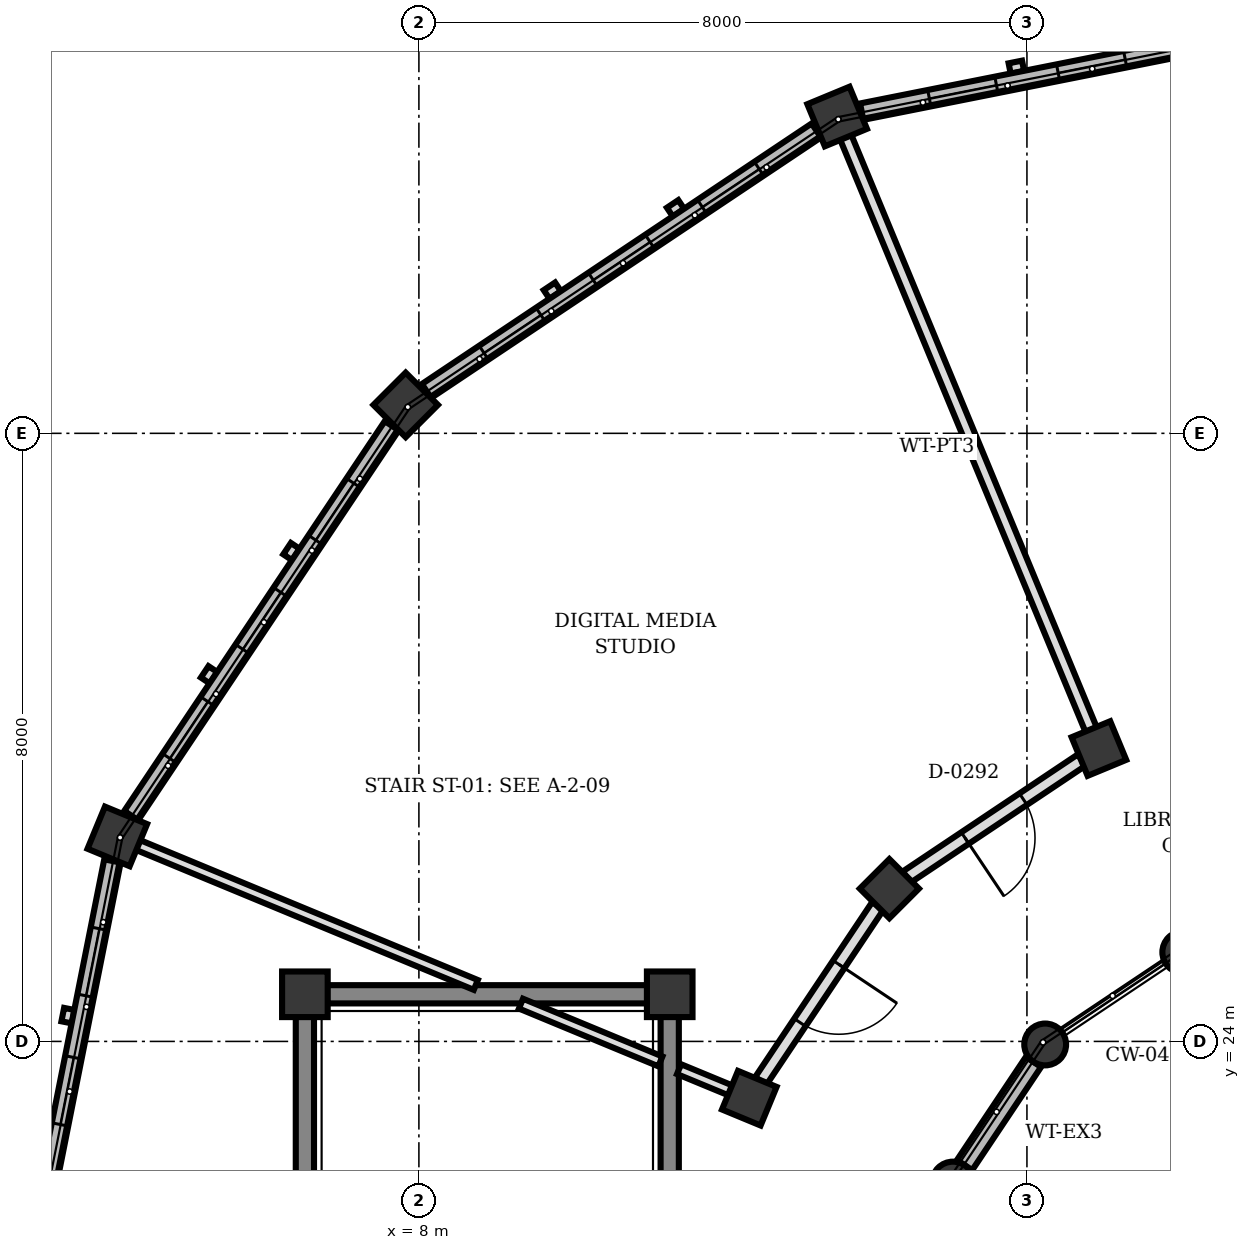
"""IFC4 building model, lengths in metres.
Left out: names, types, materials, properties, quantities, classifications, styles, units other than length and angle.
Written with IfcOpenShell. Run it as: python <this file> out.ifc"""

import sys

from ifc_helpers import new_model, si_unit, direction, frame, frame_2d, origin, origin_2d, place, context, subcontext, project, spatial, rectangle, circle, extrude, element, fill, save


model = new_model("IFC4")
c1 = context("Model", 3, precision=1e-05, world=origin(), true_north=direction((0.0, 1.0)))
c2 = subcontext(c1, "Body", "Model", "MODEL_VIEW")
j1 = project(units=[si_unit("LENGTHUNIT", "METRE"), si_unit("PLANEANGLEUNIT", "RADIAN")], contexts=[c1])
p1 = place(None, origin())
s1 = spatial("IfcSite", under=j1, at=p1, CompositionType="ELEMENT")
p2 = place(p1, origin())
s2 = spatial("IfcBuilding", under=s1, at=p2, CompositionType="ELEMENT")
p3 = place(p2, frame((0.0, 0.0, 4.5)))
s3 = spatial("IfcBuildingStorey", under=s2, at=p3, CompositionType="ELEMENT", Elevation=4.5)
for number, where, z_axis, x_axis in (
    (1, (11.3, 24.62, 0.0), (0.0, 0.0, 1.0), (1.0, 0.0, 0.0)),
    (2, (6.5, 24.62, 0.0), (0.0, 0.0, 1.0), (1.0, 0.0, 0.0)),
):
    element("IfcColumn", number, at=place(p3, frame(where, z_axis=z_axis, x_axis=x_axis)), inside=s3, PredefinedType="COLUMN", context=c2, shape_type="SweptSolid", body=[
        extrude(rectangle(XDim=0.6, YDim=0.6, at=origin_2d()), origin(), (0.0, 0.0, 1.0), 4.0),
    ])
for number, where, z_axis, x_axis in (
    (3, (18.057, 25.174, 0.0), (0.0, 0.0, 1.0), (1.0, 0.0, 0.0)),
    (4, (16.24, 23.96, 0.0), (0.0, 0.0, 1.0), (1.0, 0.0, 0.0)),
    (5, (15.026, 22.143, 0.0), (0.0, 0.0, 1.0), (1.0, 0.0, 0.0)),
):
    element("IfcColumn", number, at=place(p3, frame(where, z_axis=z_axis, x_axis=x_axis)), inside=s3, PredefinedType="COLUMN", context=c2, shape_type="SweptSolid", body=[
        extrude(circle(Radius=0.275, at=origin_2d()), origin(), (0.0, 0.0, 1.0), 4.0),
    ])
for number, where, z_axis, x_axis in (
    (6, (16.947, 27.853, 0.0), (0.0, 0.0, 1.0), (-0.383, 0.924, 0.0)),
    (7, (14.19, 26.01, 0.0), (0.0, 0.0, 1.0), (-0.707, 0.707, 0.0)),
    (8, (12.347, 23.253, 0.0), (0.0, 0.0, 1.0), (-0.924, 0.383, 0.0)),
):
    element("IfcColumn", number, at=place(p3, frame(where, z_axis=z_axis, x_axis=x_axis)), inside=s3, PredefinedType="COLUMN", context=c2, shape_type="SweptSolid", body=[
        extrude(rectangle(XDim=0.55, YDim=0.55, at=origin_2d()), origin(), (0.0, 0.0, 1.0), 4.0),
    ])
for number, where, z_axis, x_axis in (
    (9, (13.503, 36.168, 0.0), (0.0, 0.0, 1.0), (-0.383, 0.924, 0.0)),
    (10, (7.826, 32.374, 0.0), (0.0, 0.0, 1.0), (-0.707, 0.707, 0.0)),
    (11, (4.032, 26.697, 0.0), (0.0, 0.0, 1.0), (-0.924, 0.383, 0.0)),
):
    element("IfcColumn", number, at=place(p3, frame(where, z_axis=z_axis, x_axis=x_axis)), inside=s3, PredefinedType="COLUMN", context=c2, shape_type="SweptSolid", body=[
        extrude(rectangle(XDim=0.6, YDim=0.6, at=origin_2d()), origin(), (0.0, 0.0, 1.0), 4.0),
    ])
p4 = place(p3, frame((13.826, 36.232, 0.0), z_axis=(0.0, 0.0, 1.0), x_axis=(0.980770460131, 0.195164813773, 0.0)))
e12 = element("IfcWall", 12, at=p4, inside=s3, PredefinedType="SOLIDWALL", context=c2, shape_type="SweptSolid", body=[
    extrude(rectangle(XDim=6.17, YDim=0.22, at=frame_2d((3.085, 0.0))), origin(), (0.0, 0.0, 1.0), 3.172),
])
p5 = place(p4, frame((0.907, 0.0, 0.85)))
e13 = element("IfcOpeningElement", 13, at=p5, cuts=e12, PredefinedType="OPENING", context=c2, shape_type="SweptSolid", body=[
    extrude(rectangle(XDim=0.9, YDim=1.4, at=frame_2d((0.45, 0.7))), frame((0.0, 0.12, 0.0), z_axis=(0.0, -1.0, 0.0), x_axis=(1.0, 0.0, 0.0)), (0.0, 0.0, 1.0), 0.24),
])
p6 = place(p4, frame((2.635, 0.0, 0.85)))
e14 = element("IfcOpeningElement", 14, at=p6, cuts=e12, PredefinedType="OPENING", context=c2, shape_type="SweptSolid", body=[
    extrude(rectangle(XDim=0.9, YDim=1.4, at=frame_2d((0.45, 0.7))), frame((0.0, 0.12, 0.0), z_axis=(0.0, -1.0, 0.0), x_axis=(1.0, 0.0, 0.0)), (0.0, 0.0, 1.0), 0.24),
])
p7 = place(p4, frame((4.362, 0.0, 0.85)))
e15 = element("IfcOpeningElement", 15, at=p7, cuts=e12, PredefinedType="OPENING", context=c2, shape_type="SweptSolid", body=[
    extrude(rectangle(XDim=0.9, YDim=1.4, at=frame_2d((0.45, 0.7))), frame((0.0, 0.12, 0.0), z_axis=(0.0, -1.0, 0.0), x_axis=(1.0, 0.0, 0.0)), (0.0, 0.0, 1.0), 0.24),
])
p8 = place(p3, frame((8.1, 32.557, 0.0), z_axis=(0.0, 0.0, 1.0), x_axis=(0.831379966495, 0.555704374025, 0.0)))
e16 = element("IfcWall", 16, at=p8, inside=s3, PredefinedType="SOLIDWALL", context=c2, shape_type="SweptSolid", body=[
    extrude(rectangle(XDim=6.169, YDim=0.22, at=frame_2d((3.084, 0.0))), origin(), (0.0, 0.0, 1.0), 3.172),
])
p9 = place(p8, frame((0.907, 0.0, 0.85)))
e17 = element("IfcOpeningElement", 17, at=p9, cuts=e16, PredefinedType="OPENING", context=c2, shape_type="SweptSolid", body=[
    extrude(rectangle(XDim=0.9, YDim=1.4, at=frame_2d((0.45, 0.7))), frame((0.0, 0.12, 0.0), z_axis=(0.0, -1.0, 0.0), x_axis=(1.0, 0.0, 0.0)), (0.0, 0.0, 1.0), 0.24),
])
p10 = place(p8, frame((2.635, 0.0, 0.85)))
e18 = element("IfcOpeningElement", 18, at=p10, cuts=e16, PredefinedType="OPENING", context=c2, shape_type="SweptSolid", body=[
    extrude(rectangle(XDim=0.9, YDim=1.4, at=frame_2d((0.45, 0.7))), frame((0.0, 0.12, 0.0), z_axis=(0.0, -1.0, 0.0), x_axis=(1.0, 0.0, 0.0)), (0.0, 0.0, 1.0), 0.24),
])
p11 = place(p8, frame((4.362, 0.0, 0.85)))
e19 = element("IfcOpeningElement", 19, at=p11, cuts=e16, PredefinedType="OPENING", context=c2, shape_type="SweptSolid", body=[
    extrude(rectangle(XDim=0.9, YDim=1.4, at=frame_2d((0.45, 0.7))), frame((0.0, 0.12, 0.0), z_axis=(0.0, -1.0, 0.0), x_axis=(1.0, 0.0, 0.0)), (0.0, 0.0, 1.0), 0.24),
])
p12 = place(p3, frame((4.215, 26.971, 0.0), z_axis=(0.0, 0.0, 1.0), x_axis=(0.555658736667, 0.831410469242, 0.0)))
e20 = element("IfcWall", 20, at=p12, inside=s3, PredefinedType="SOLIDWALL", context=c2, shape_type="SweptSolid", body=[
    extrude(rectangle(XDim=6.169, YDim=0.22, at=frame_2d((3.084, 0.0))), origin(), (0.0, 0.0, 1.0), 3.172),
])
p13 = place(p12, frame((0.907, 0.0, 0.85)))
e21 = element("IfcOpeningElement", 21, at=p13, cuts=e20, PredefinedType="OPENING", context=c2, shape_type="SweptSolid", body=[
    extrude(rectangle(XDim=0.9, YDim=1.4, at=frame_2d((0.45, 0.7))), frame((0.0, 0.12, 0.0), z_axis=(0.0, -1.0, 0.0), x_axis=(1.0, 0.0, 0.0)), (0.0, 0.0, 1.0), 0.24),
])
p14 = place(p12, frame((2.635, 0.0, 0.85)))
e22 = element("IfcOpeningElement", 22, at=p14, cuts=e20, PredefinedType="OPENING", context=c2, shape_type="SweptSolid", body=[
    extrude(rectangle(XDim=0.9, YDim=1.4, at=frame_2d((0.45, 0.7))), frame((0.0, 0.12, 0.0), z_axis=(0.0, -1.0, 0.0), x_axis=(1.0, 0.0, 0.0)), (0.0, 0.0, 1.0), 0.24),
])
p15 = place(p12, frame((4.362, 0.0, 0.85)))
e23 = element("IfcOpeningElement", 23, at=p15, cuts=e20, PredefinedType="OPENING", context=c2, shape_type="SweptSolid", body=[
    extrude(rectangle(XDim=0.9, YDim=1.4, at=frame_2d((0.45, 0.7))), frame((0.0, 0.12, 0.0), z_axis=(0.0, -1.0, 0.0), x_axis=(1.0, 0.0, 0.0)), (0.0, 0.0, 1.0), 0.24),
])
p16 = place(p3, frame((16.086, 23.73, 0.0), z_axis=(0.0, 0.0, 1.0), x_axis=(-0.555287078904, -0.83165874011, 0.0)))
e24 = element("IfcWall", 24, at=p16, inside=s3, PredefinedType="SOLIDWALL", context=c2, shape_type="SweptSolid", body=[
    extrude(rectangle(XDim=1.632, YDim=0.24, at=frame_2d((0.816, 0.0))), origin(), (0.0, 0.0, 1.0), 3.222),
])
p17 = place(p3, frame((2.764, 20.323, 0.0), z_axis=(0.0, 0.0, 1.0), x_axis=(0.195164813773, 0.980770460131, 0.0)))
e25 = element("IfcWall", 25, at=p17, inside=s3, PredefinedType="SOLIDWALL", context=c2, shape_type="SweptSolid", body=[
    extrude(rectangle(XDim=6.17, YDim=0.22, at=frame_2d((3.085, 0.0))), origin(), (0.0, 0.0, 1.0), 3.172),
])
p18 = place(p17, frame((0.907, 0.0, 0.85)))
e26 = element("IfcOpeningElement", 26, at=p18, cuts=e25, PredefinedType="OPENING", context=c2, shape_type="SweptSolid", body=[
    extrude(rectangle(XDim=0.9, YDim=1.4, at=frame_2d((0.45, 0.7))), frame((0.0, 0.12, 0.0), z_axis=(0.0, -1.0, 0.0), x_axis=(1.0, 0.0, 0.0)), (0.0, 0.0, 1.0), 0.24),
])
p19 = place(p17, frame((2.635, 0.0, 0.85)))
e27 = element("IfcOpeningElement", 27, at=p19, cuts=e25, PredefinedType="OPENING", context=c2, shape_type="SweptSolid", body=[
    extrude(rectangle(XDim=0.9, YDim=1.4, at=frame_2d((0.45, 0.7))), frame((0.0, 0.12, 0.0), z_axis=(0.0, -1.0, 0.0), x_axis=(1.0, 0.0, 0.0)), (0.0, 0.0, 1.0), 0.24),
])
p20 = place(p17, frame((4.362, 0.0, 0.85)))
e28 = element("IfcOpeningElement", 28, at=p20, cuts=e25, PredefinedType="OPENING", context=c2, shape_type="SweptSolid", body=[
    extrude(rectangle(XDim=0.9, YDim=1.4, at=frame_2d((0.45, 0.7))), frame((0.0, 0.12, 0.0), z_axis=(0.0, -1.0, 0.0), x_axis=(1.0, 0.0, 0.0)), (0.0, 0.0, 1.0), 0.24),
])
p21 = place(p3, frame((6.5, 16.192, 0.0), z_axis=(0.0, 0.0, 1.0), x_axis=(0.0, 1.0, 0.0)))
e29 = element("IfcWall", 29, at=p21, inside=s3, PredefinedType="SHEAR", context=c2, shape_type="SweptSolid", body=[
    extrude(rectangle(XDim=8.136, YDim=0.24, at=frame_2d((4.068, 0.0))), origin(), (0.0, 0.0, 1.0), 3.74),
])
p22 = place(p3, frame((11.3, 24.328, 0.0), z_axis=(0.0, 0.0, 1.0), x_axis=(0.0, -1.0, 0.0)))
e30 = element("IfcWall", 30, at=p22, inside=s3, PredefinedType="SHEAR", context=c2, shape_type="SweptSolid", body=[
    extrude(rectangle(XDim=8.136, YDim=0.24, at=frame_2d((4.068, 0.0))), origin(), (0.0, 0.0, 1.0), 3.74),
])
p23 = place(p22, frame((6.244, 0.0, 0.0)))
e31 = element("IfcOpeningElement", 31, at=p23, cuts=e30, PredefinedType="OPENING", context=c2, shape_type="SweptSolid", body=[
    extrude(rectangle(XDim=0.88, YDim=2.1, at=frame_2d((0.44, 1.05))), frame((0.0, 0.13, 0.0), z_axis=(0.0, -1.0, 0.0), x_axis=(1.0, 0.0, 0.0)), (0.0, 0.0, 1.0), 0.26),
])
p24 = place(p3, frame((11.008, 24.62, 0.0), z_axis=(0.0, 0.0, 1.0), x_axis=(-1.0, 0.0, 0.0)))
e32 = element("IfcWall", 32, at=p24, inside=s3, PredefinedType="SHEAR", context=c2, shape_type="SweptSolid", body=[
    extrude(rectangle(XDim=4.216, YDim=0.24, at=frame_2d((2.108, 0.0))), origin(), (0.0, 0.0, 1.0), 3.74),
])
p25 = place(p3, frame((16.845, 28.1, 0.0), z_axis=(0.0, 0.0, 1.0), x_axis=(-0.382683896966, 0.923879340067, 0.0)))
e33 = element("IfcWall", 33, at=p25, inside=s3, PredefinedType="PARTITIONING", context=c2, shape_type="SweptSolid", body=[
    extrude(rectangle(XDim=8.44, YDim=0.16, at=frame_2d((4.22, 0.0))), origin(), (0.0, 0.0, 1.0), 3.072),
])
p26 = place(p3, frame((12.1, 23.355, 0.0), z_axis=(0.0, 0.0, 1.0), x_axis=(-0.924069600435, 0.382224245113, 0.0)))
e34 = element("IfcWall", 34, at=p26, inside=s3, PredefinedType="PARTITIONING", context=c2, shape_type="SweptSolid", body=[
    extrude(rectangle(XDim=0.733, YDim=0.14, at=frame_2d((0.366, 0.0))), origin(), (0.0, 0.0, 1.0), 3.7),
])
p27 = place(p3, frame((11.177, 23.737, 0.0), z_axis=(0.0, 0.0, 1.0), x_axis=(-0.923817443679, 0.382833293686, 0.0)))
e35 = element("IfcWall", 35, at=p27, inside=s3, PredefinedType="PARTITIONING", context=c2, shape_type="SweptSolid", body=[
    extrude(rectangle(XDim=1.985, YDim=0.14, at=frame_2d((0.993, 0.0))), origin(), (0.0, 0.0, 1.0), 3.7),
])
p28 = place(p3, frame((8.749, 24.743, 0.0), z_axis=(0.0, 0.0, 1.0), x_axis=(-0.923877739946, 0.382687759972, 0.0)))
e36 = element("IfcWall", 36, at=p28, inside=s3, PredefinedType="PARTITIONING", context=c2, shape_type="SweptSolid", body=[
    extrude(rectangle(XDim=4.813, YDim=0.14, at=frame_2d((2.407, 0.0))), origin(), (0.0, 0.0, 1.0), 3.7),
])
p29 = place(p3, frame((16.721, 27.702, 0.0), z_axis=(0.0, 0.0, 1.0), x_axis=(-0.831318045056, -0.555797002478, 0.0)))
e37 = element("IfcWall", 37, at=p29, inside=s3, PredefinedType="PARTITIONING", context=c2, shape_type="SweptSolid", body=[
    extrude(rectangle(XDim=2.773, YDim=0.18, at=frame_2d((1.386, 0.0))), origin(), (0.0, 0.0, 1.0), 3.072),
])
p30 = place(p29, frame((0.926, 0.0, 0.0)))
e38 = element("IfcOpeningElement", 38, at=p30, cuts=e37, PredefinedType="OPENING", context=c2, shape_type="SweptSolid", body=[
    extrude(rectangle(XDim=0.92, YDim=2.1, at=frame_2d((0.46, 1.05))), frame((0.0, 0.1, 0.0), z_axis=(0.0, -1.0, 0.0), x_axis=(1.0, 0.0, 0.0)), (0.0, 0.0, 1.0), 0.2),
])
p31 = place(p3, frame((14.039, 25.784, 0.0), z_axis=(0.0, 0.0, 1.0), x_axis=(-0.555797002478, -0.831318045056, 0.0)))
e39 = element("IfcWall", 39, at=p31, inside=s3, PredefinedType="PARTITIONING", context=c2, shape_type="SweptSolid", body=[
    extrude(rectangle(XDim=2.773, YDim=0.18, at=frame_2d((1.386, 0.0))), origin(), (0.0, 0.0, 1.0), 3.072),
])
p32 = place(p31, frame((0.926, 0.0, 0.0)))
e40 = element("IfcOpeningElement", 40, at=p32, cuts=e39, PredefinedType="OPENING", context=c2, shape_type="SweptSolid", body=[
    extrude(rectangle(XDim=0.92, YDim=2.1, at=frame_2d((0.46, 1.05))), frame((0.0, 0.1, 0.0), z_axis=(0.0, -1.0, 0.0), x_axis=(1.0, 0.0, 0.0)), (0.0, 0.0, 1.0), 0.2),
])
p33 = place(p5, origin())
e41 = element("IfcWindow", 41, at=p33, inside=s3, PartitioningType="SINGLE_PANEL", PredefinedType="WINDOW", context=c2, shape_type="SweptSolid", body=[
    extrude(rectangle(XDim=0.9, YDim=1.4, at=frame_2d((0.45, 0.7))), frame((0.0, 0.03, 0.0), z_axis=(0.0, -1.0, 0.0), x_axis=(1.0, 0.0, 0.0)), (0.0, 0.0, 1.0), 0.06),
])
fill(e13, e41)
p34 = place(p6, origin())
e42 = element("IfcWindow", 42, at=p34, inside=s3, PartitioningType="SINGLE_PANEL", PredefinedType="WINDOW", context=c2, shape_type="SweptSolid", body=[
    extrude(rectangle(XDim=0.9, YDim=1.4, at=frame_2d((0.45, 0.7))), frame((0.0, 0.03, 0.0), z_axis=(0.0, -1.0, 0.0), x_axis=(1.0, 0.0, 0.0)), (0.0, 0.0, 1.0), 0.06),
])
fill(e14, e42)
p35 = place(p9, origin())
e43 = element("IfcWindow", 43, at=p35, inside=s3, PartitioningType="SINGLE_PANEL", PredefinedType="WINDOW", context=c2, shape_type="SweptSolid", body=[
    extrude(rectangle(XDim=0.9, YDim=1.4, at=frame_2d((0.45, 0.7))), frame((0.0, 0.03, 0.0), z_axis=(0.0, -1.0, 0.0), x_axis=(1.0, 0.0, 0.0)), (0.0, 0.0, 1.0), 0.06),
])
fill(e17, e43)
p36 = place(p10, origin())
e44 = element("IfcWindow", 44, at=p36, inside=s3, PartitioningType="SINGLE_PANEL", PredefinedType="WINDOW", context=c2, shape_type="SweptSolid", body=[
    extrude(rectangle(XDim=0.9, YDim=1.4, at=frame_2d((0.45, 0.7))), frame((0.0, 0.03, 0.0), z_axis=(0.0, -1.0, 0.0), x_axis=(1.0, 0.0, 0.0)), (0.0, 0.0, 1.0), 0.06),
])
fill(e18, e44)
p37 = place(p11, origin())
e45 = element("IfcWindow", 45, at=p37, inside=s3, PartitioningType="SINGLE_PANEL", PredefinedType="WINDOW", context=c2, shape_type="SweptSolid", body=[
    extrude(rectangle(XDim=0.9, YDim=1.4, at=frame_2d((0.45, 0.7))), frame((0.0, 0.03, 0.0), z_axis=(0.0, -1.0, 0.0), x_axis=(1.0, 0.0, 0.0)), (0.0, 0.0, 1.0), 0.06),
])
fill(e19, e45)
p38 = place(p13, origin())
e46 = element("IfcWindow", 46, at=p38, inside=s3, PartitioningType="SINGLE_PANEL", PredefinedType="WINDOW", context=c2, shape_type="SweptSolid", body=[
    extrude(rectangle(XDim=0.9, YDim=1.4, at=frame_2d((0.45, 0.7))), frame((0.0, 0.03, 0.0), z_axis=(0.0, -1.0, 0.0), x_axis=(1.0, 0.0, 0.0)), (0.0, 0.0, 1.0), 0.06),
])
fill(e21, e46)
p39 = place(p14, origin())
e47 = element("IfcWindow", 47, at=p39, inside=s3, PartitioningType="SINGLE_PANEL", PredefinedType="WINDOW", context=c2, shape_type="SweptSolid", body=[
    extrude(rectangle(XDim=0.9, YDim=1.4, at=frame_2d((0.45, 0.7))), frame((0.0, 0.03, 0.0), z_axis=(0.0, -1.0, 0.0), x_axis=(1.0, 0.0, 0.0)), (0.0, 0.0, 1.0), 0.06),
])
fill(e22, e47)
p40 = place(p15, origin())
e48 = element("IfcWindow", 48, at=p40, inside=s3, PartitioningType="SINGLE_PANEL", PredefinedType="WINDOW", context=c2, shape_type="SweptSolid", body=[
    extrude(rectangle(XDim=0.9, YDim=1.4, at=frame_2d((0.45, 0.7))), frame((0.0, 0.03, 0.0), z_axis=(0.0, -1.0, 0.0), x_axis=(1.0, 0.0, 0.0)), (0.0, 0.0, 1.0), 0.06),
])
fill(e23, e48)
p41 = place(p19, origin())
e49 = element("IfcWindow", 49, at=p41, inside=s3, PartitioningType="SINGLE_PANEL", PredefinedType="WINDOW", context=c2, shape_type="SweptSolid", body=[
    extrude(rectangle(XDim=0.9, YDim=1.4, at=frame_2d((0.45, 0.7))), frame((0.0, 0.03, 0.0), z_axis=(0.0, -1.0, 0.0), x_axis=(1.0, 0.0, 0.0)), (0.0, 0.0, 1.0), 0.06),
])
fill(e27, e49)
p42 = place(p20, origin())
e50 = element("IfcWindow", 50, at=p42, inside=s3, PartitioningType="SINGLE_PANEL", PredefinedType="WINDOW", context=c2, shape_type="SweptSolid", body=[
    extrude(rectangle(XDim=0.9, YDim=1.4, at=frame_2d((0.45, 0.7))), frame((0.0, 0.03, 0.0), z_axis=(0.0, -1.0, 0.0), x_axis=(1.0, 0.0, 0.0)), (0.0, 0.0, 1.0), 0.06),
])
fill(e28, e50)
p43 = place(p30, origin())
e51 = element("IfcDoor", 51, at=p43, inside=s3, OperationType="SINGLE_SWING_RIGHT", PredefinedType="DOOR", context=c2, shape_type="SweptSolid", body=[
    extrude(rectangle(XDim=0.92, YDim=2.1, at=frame_2d((0.46, 1.05))), frame((0.0, 0.025, 0.0), z_axis=(0.0, -1.0, 0.0), x_axis=(1.0, 0.0, 0.0)), (0.0, 0.0, 1.0), 0.05),
])
fill(e38, e51)
p44 = place(p32, origin())
e52 = element("IfcDoor", 52, at=p44, inside=s3, OperationType="SINGLE_SWING_LEFT", PredefinedType="DOOR", context=c2, shape_type="SweptSolid", body=[
    extrude(rectangle(XDim=0.92, YDim=2.1, at=frame_2d((0.46, 1.05))), frame((0.0, 0.025, 0.0), z_axis=(0.0, -1.0, 0.0), x_axis=(1.0, 0.0, 0.0)), (0.0, 0.0, 1.0), 0.05),
])
fill(e40, e52)
save(model, sys.argv[1])
